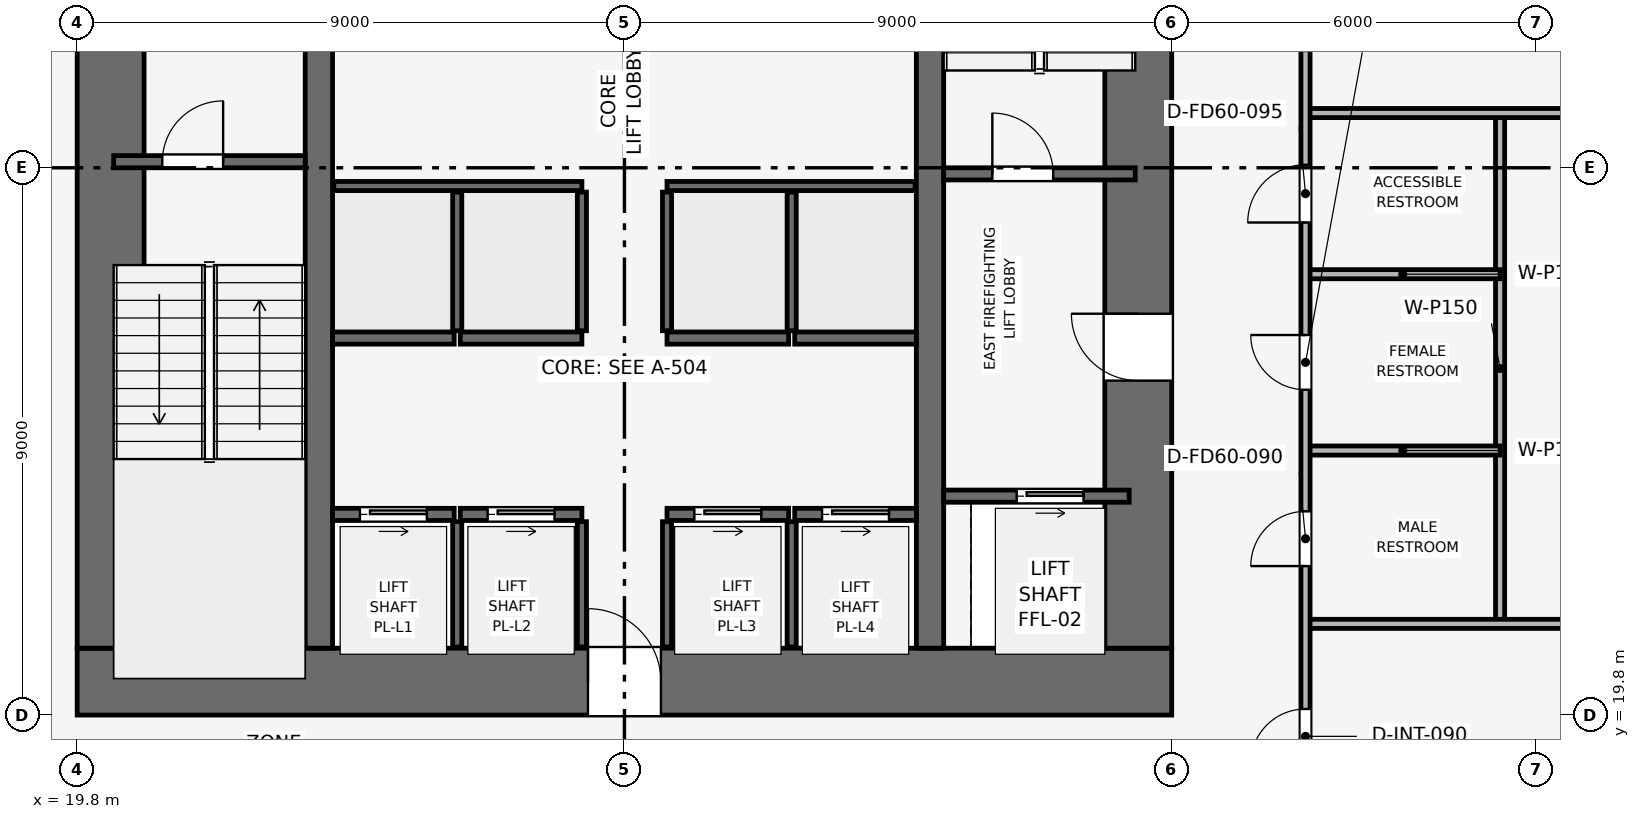
"""IFC4 building model, lengths in metres.
Left out: names, types, materials, properties, quantities, classifications, styles, units other than length and angle.
Written with IfcOpenShell. Run it as: python <this file> out.ifc"""

import sys

from ifc_helpers import new_model, si_unit, direction, frame, frame_2d, origin, place, context, subcontext, project, spatial, rectangle, extrude, element, fill, save


model = new_model("IFC4")
c1 = context("Model", 3, precision=1e-05, world=origin(), true_north=direction((0.0, 1.0)))
c2 = subcontext(c1, "Body", "Model", "MODEL_VIEW")
j1 = project(units=[si_unit("LENGTHUNIT", "METRE"), si_unit("PLANEANGLEUNIT", "RADIAN")], contexts=[c1])
p1 = place(None, origin())
s1 = spatial("IfcSite", under=j1, at=p1, CompositionType="ELEMENT")
p2 = place(p1, origin())
s2 = spatial("IfcBuilding", under=s1, at=p2, CompositionType="ELEMENT")
p3 = place(p2, frame((0.0, 0.0, 45.6)))
s3 = spatial("IfcBuildingStorey", under=s2, at=p3, CompositionType="ELEMENT", Elevation=45.6)
p4 = place(p3, frame((19.8, 20.35, 0.0), z_axis=(0.0, 0.0, 1.0), x_axis=(1.0, 0.0, 0.0)))
e1 = element("IfcWall", 1, at=p4, inside=s3, PredefinedType="SHEAR", context=c2, shape_type="SweptSolid", body=[
    extrude(rectangle(XDim=18.0, YDim=1.1, at=frame_2d((9.0, 0.0))), origin(), (0.0, 0.0, 1.0), 3.9),
])
p5 = place(p4, frame((8.4, 0.0, 0.0)))
e2 = element("IfcOpeningElement", 2, at=p5, cuts=e1, PredefinedType="OPENING", context=c2, shape_type="SweptSolid", body=[
    extrude(rectangle(XDim=1.2, YDim=2.2, at=frame_2d((0.6, 1.1))), frame((0.0, 0.56, 0.0), z_axis=(0.0, -1.0, 0.0), x_axis=(1.0, 0.0, 0.0)), (0.0, 0.0, 1.0), 1.12),
])
p6 = place(p3, frame((20.35, 20.9, 0.0), z_axis=(0.0, 0.0, 1.0), x_axis=(0.0, 1.0, 0.0)))
e3 = element("IfcWall", 3, at=p6, inside=s3, PredefinedType="SHEAR", context=c2, shape_type="SweptSolid", body=[
    extrude(rectangle(XDim=15.8, YDim=1.1, at=frame_2d((7.9, 0.0))), origin(), (0.0, 0.0, 1.0), 3.9),
])
p7 = place(p6, frame((9.9, 0.0, 0.0)))
e4 = element("IfcOpeningElement", 4, at=p7, cuts=e3, PredefinedType="OPENING", context=c2, shape_type="SweptSolid", body=[
    extrude(rectangle(XDim=1.1, YDim=2.15, at=frame_2d((0.55, 1.075))), frame((0.0, 0.56, 0.0), z_axis=(0.0, -1.0, 0.0), x_axis=(1.0, 0.0, 0.0)), (0.0, 0.0, 1.0), 1.12),
])
p8 = place(p3, frame((37.25, 20.9, 0.0), z_axis=(0.0, 0.0, 1.0), x_axis=(0.0, 1.0, 0.0)))
e5 = element("IfcWall", 5, at=p8, inside=s3, PredefinedType="SHEAR", context=c2, shape_type="SweptSolid", body=[
    extrude(rectangle(XDim=15.8, YDim=1.1, at=frame_2d((7.9, 0.0))), origin(), (0.0, 0.0, 1.0), 3.9),
])
p9 = place(p8, frame((4.4, 0.0, 0.0)))
e6 = element("IfcOpeningElement", 6, at=p9, cuts=e5, PredefinedType="OPENING", context=c2, shape_type="SweptSolid", body=[
    extrude(rectangle(XDim=1.1, YDim=2.15, at=frame_2d((0.55, 1.075))), frame((0.0, 0.56, 0.0), z_axis=(0.0, -1.0, 0.0), x_axis=(1.0, 0.0, 0.0)), (0.0, 0.0, 1.0), 1.12),
])
for number, where, z_axis, x_axis in (
    (7, (23.775, 20.9, 0.0), (0.0, 0.0, 1.0), (0.0, 1.0, 0.0)),
    (8, (33.825, 20.9, 0.0), (0.0, 0.0, 1.0), (0.0, 1.0, 0.0)),
):
    element("IfcWall", number, at=place(p3, frame(where, z_axis=z_axis, x_axis=x_axis)), inside=s3, PredefinedType="SHEAR", context=c2, shape_type="SweptSolid", body=[
        extrude(rectangle(XDim=15.8, YDim=0.45, at=frame_2d((7.9, 0.0))), origin(), (0.0, 0.0, 1.0), 3.9),
    ])
p10 = place(p3, frame((20.4, 28.9, 0.0), z_axis=(0.0, 0.0, 1.0), x_axis=(1.0, 0.0, 0.0)))
e9 = element("IfcWall", 9, at=p10, inside=s3, PredefinedType="SHEAR", context=c2, shape_type="SweptSolid", body=[
    extrude(rectangle(XDim=3.15, YDim=0.2, at=frame_2d((1.575, 0.0))), origin(), (0.0, 0.0, 1.0), 3.65),
])
p11 = place(p10, frame((0.8, 0.0, 0.0)))
e10 = element("IfcOpeningElement", 10, at=p11, cuts=e9, PredefinedType="OPENING", context=c2, shape_type="SweptSolid", body=[
    extrude(rectangle(XDim=1.0, YDim=2.1, at=frame_2d((0.5, 1.05))), frame((0.0, 0.11, 0.0), z_axis=(0.0, -1.0, 0.0), x_axis=(1.0, 0.0, 0.0)), (0.0, 0.0, 1.0), 0.22),
])
p12 = place(p3, frame((34.05, 28.7, 0.0), z_axis=(0.0, 0.0, 1.0), x_axis=(1.0, 0.0, 0.0)))
e11 = element("IfcWall", 11, at=p12, inside=s3, PredefinedType="SHEAR", context=c2, shape_type="SweptSolid", body=[
    extrude(rectangle(XDim=3.15, YDim=0.2, at=frame_2d((1.575, 0.0))), origin(), (0.0, 0.0, 1.0), 3.65),
])
p13 = place(p12, frame((0.8, 0.0, 0.0)))
e12 = element("IfcOpeningElement", 12, at=p13, cuts=e11, PredefinedType="OPENING", context=c2, shape_type="SweptSolid", body=[
    extrude(rectangle(XDim=1.0, YDim=2.1, at=frame_2d((0.5, 1.05))), frame((0.0, 0.11, 0.0), z_axis=(0.0, -1.0, 0.0), x_axis=(1.0, 0.0, 0.0)), (0.0, 0.0, 1.0), 0.22),
])
p14 = place(p3, frame((34.05, 23.4, 0.0), z_axis=(0.0, 0.0, 1.0), x_axis=(1.0, 0.0, 0.0)))
e13 = element("IfcWall", 13, at=p14, inside=s3, PredefinedType="SHEAR", context=c2, shape_type="SweptSolid", body=[
    extrude(rectangle(XDim=3.05, YDim=0.2, at=frame_2d((1.525, 0.0))), origin(), (0.0, 0.0, 1.0), 3.65),
])
p15 = place(p14, frame((1.2, 0.0, 0.0)))
e14 = element("IfcOpeningElement", 14, at=p15, cuts=e13, PredefinedType="OPENING", context=c2, shape_type="SweptSolid", body=[
    extrude(rectangle(XDim=1.1, YDim=2.15, at=frame_2d((0.55, 1.075))), frame((0.0, 0.11, 0.0), z_axis=(0.0, -1.0, 0.0), x_axis=(1.0, 0.0, 0.0)), (0.0, 0.0, 1.0), 0.22),
])
p16 = place(p3, frame((24.0, 23.1, 0.0), z_axis=(0.0, 0.0, 1.0), x_axis=(1.0, 0.0, 0.0)))
e15 = element("IfcWall", 15, at=p16, inside=s3, PredefinedType="SHEAR", context=c2, shape_type="SweptSolid", body=[
    extrude(rectangle(XDim=2.0, YDim=0.2, at=frame_2d((1.0, 0.0))), origin(), (0.0, 0.0, 1.0), 3.65),
])
p17 = place(p16, frame((0.45, 0.0, 0.0)))
e16 = element("IfcOpeningElement", 16, at=p17, cuts=e15, PredefinedType="OPENING", context=c2, shape_type="SweptSolid", body=[
    extrude(rectangle(XDim=1.1, YDim=2.15, at=frame_2d((0.55, 1.075))), frame((0.0, 0.11, 0.0), z_axis=(0.0, -1.0, 0.0), x_axis=(1.0, 0.0, 0.0)), (0.0, 0.0, 1.0), 0.22),
])
p18 = place(p3, frame((26.1, 23.1, 0.0), z_axis=(0.0, 0.0, 1.0), x_axis=(1.0, 0.0, 0.0)))
e17 = element("IfcWall", 17, at=p18, inside=s3, PredefinedType="SHEAR", context=c2, shape_type="SweptSolid", body=[
    extrude(rectangle(XDim=2.0, YDim=0.2, at=frame_2d((1.0, 0.0))), origin(), (0.0, 0.0, 1.0), 3.65),
])
p19 = place(p18, frame((0.45, 0.0, 0.0)))
e18 = element("IfcOpeningElement", 18, at=p19, cuts=e17, PredefinedType="OPENING", context=c2, shape_type="SweptSolid", body=[
    extrude(rectangle(XDim=1.1, YDim=2.15, at=frame_2d((0.55, 1.075))), frame((0.0, 0.11, 0.0), z_axis=(0.0, -1.0, 0.0), x_axis=(1.0, 0.0, 0.0)), (0.0, 0.0, 1.0), 0.22),
])
p20 = place(p3, frame((29.5, 23.1, 0.0), z_axis=(0.0, 0.0, 1.0), x_axis=(1.0, 0.0, 0.0)))
e19 = element("IfcWall", 19, at=p20, inside=s3, PredefinedType="SHEAR", context=c2, shape_type="SweptSolid", body=[
    extrude(rectangle(XDim=2.0, YDim=0.2, at=frame_2d((1.0, 0.0))), origin(), (0.0, 0.0, 1.0), 3.65),
])
p21 = place(p20, frame((0.45, 0.0, 0.0)))
e20 = element("IfcOpeningElement", 20, at=p21, cuts=e19, PredefinedType="OPENING", context=c2, shape_type="SweptSolid", body=[
    extrude(rectangle(XDim=1.1, YDim=2.15, at=frame_2d((0.55, 1.075))), frame((0.0, 0.11, 0.0), z_axis=(0.0, -1.0, 0.0), x_axis=(1.0, 0.0, 0.0)), (0.0, 0.0, 1.0), 0.22),
])
p22 = place(p3, frame((31.6, 23.1, 0.0), z_axis=(0.0, 0.0, 1.0), x_axis=(1.0, 0.0, 0.0)))
e21 = element("IfcWall", 21, at=p22, inside=s3, PredefinedType="SHEAR", context=c2, shape_type="SweptSolid", body=[
    extrude(rectangle(XDim=2.0, YDim=0.2, at=frame_2d((1.0, 0.0))), origin(), (0.0, 0.0, 1.0), 3.65),
])
p23 = place(p22, frame((0.45, 0.0, 0.0)))
e22 = element("IfcOpeningElement", 22, at=p23, cuts=e21, PredefinedType="OPENING", context=c2, shape_type="SweptSolid", body=[
    extrude(rectangle(XDim=1.1, YDim=2.15, at=frame_2d((0.55, 1.075))), frame((0.0, 0.11, 0.0), z_axis=(0.0, -1.0, 0.0), x_axis=(1.0, 0.0, 0.0)), (0.0, 0.0, 1.0), 0.22),
])
for number, where, z_axis, x_axis in (
    (23, (24.0, 26.0, 0.0), (0.0, 0.0, 1.0), (1.0, 0.0, 0.0)),
    (24, (26.1, 26.0, 0.0), (0.0, 0.0, 1.0), (1.0, 0.0, 0.0)),
    (25, (29.5, 26.0, 0.0), (0.0, 0.0, 1.0), (1.0, 0.0, 0.0)),
    (26, (31.6, 26.0, 0.0), (0.0, 0.0, 1.0), (1.0, 0.0, 0.0)),
):
    element("IfcWall", number, at=place(p3, frame(where, z_axis=z_axis, x_axis=x_axis)), inside=s3, PredefinedType="SHEAR", context=c2, shape_type="SweptSolid", body=[
        extrude(rectangle(XDim=2.0, YDim=0.2, at=frame_2d((1.0, 0.0))), origin(), (0.0, 0.0, 1.0), 3.65),
    ])
for number, where, z_axis, x_axis in (
    (27, (26.05, 20.92, 0.0), (0.0, 0.0, 1.0), (0.0, 1.0, 0.0)),
    (28, (28.1, 20.92, 0.0), (0.0, 0.0, 1.0), (0.0, 1.0, 0.0)),
    (29, (29.5, 20.92, 0.0), (0.0, 0.0, 1.0), (0.0, 1.0, 0.0)),
    (30, (31.55, 20.92, 0.0), (0.0, 0.0, 1.0), (0.0, 1.0, 0.0)),
):
    element("IfcWall", number, at=place(p3, frame(where, z_axis=z_axis, x_axis=x_axis)), inside=s3, PredefinedType="SHEAR", context=c2, shape_type="SweptSolid", body=[
        extrude(rectangle(XDim=2.06, YDim=0.15, at=frame_2d((1.03, 0.0))), origin(), (0.0, 0.0, 1.0), 3.65),
    ])
for number, where, z_axis, x_axis in (
    (31, (24.02, 28.5, 0.0), (0.0, 0.0, 1.0), (1.0, 0.0, 0.0)),
    (32, (29.5, 28.5, 0.0), (0.0, 0.0, 1.0), (1.0, 0.0, 0.0)),
):
    element("IfcWall", number, at=place(p3, frame(where, z_axis=z_axis, x_axis=x_axis)), inside=s3, PredefinedType="SHEAR", context=c2, shape_type="SweptSolid", body=[
        extrude(rectangle(XDim=4.08, YDim=0.15, at=frame_2d((2.04, 0.0))), origin(), (0.0, 0.0, 1.0), 3.65),
    ])
for number, where, z_axis, x_axis in (
    (33, (26.05, 26.12, 0.0), (0.0, 0.0, 1.0), (0.0, 1.0, 0.0)),
    (34, (28.1, 26.12, 0.0), (0.0, 0.0, 1.0), (0.0, 1.0, 0.0)),
    (35, (29.5, 26.12, 0.0), (0.0, 0.0, 1.0), (0.0, 1.0, 0.0)),
    (36, (31.55, 26.12, 0.0), (0.0, 0.0, 1.0), (0.0, 1.0, 0.0)),
):
    element("IfcWall", number, at=place(p3, frame(where, z_axis=z_axis, x_axis=x_axis)), inside=s3, PredefinedType="SHEAR", context=c2, shape_type="SweptSolid", body=[
        extrude(rectangle(XDim=2.28, YDim=0.15, at=frame_2d((1.14, 0.0))), origin(), (0.0, 0.0, 1.0), 3.65),
    ])
p24 = place(p3, frame((43.2, 21.3, 0.0), z_axis=(0.0, 0.0, 1.0), x_axis=(0.0, 1.0, 0.0)))
e37 = element("IfcWall", 37, at=p24, inside=s3, PredefinedType="PARTITIONING", context=c2, shape_type="SweptSolid", body=[
    extrude(rectangle(XDim=8.4, YDim=0.15, at=frame_2d((4.2, 0.0))), origin(), (0.0, 0.0, 1.0), 3.085),
])
p25 = place(p3, frame((40.0, 21.3, 0.0), z_axis=(0.0, 0.0, 1.0), x_axis=(1.0, 0.0, 0.0)))
e38 = element("IfcWall", 38, at=p25, inside=s3, PredefinedType="PARTITIONING", context=c2, shape_type="SweptSolid", body=[
    extrude(rectangle(XDim=16.57, YDim=0.15, at=frame_2d((8.285, 0.0))), origin(), (0.0, 0.0, 1.0), 2.935),
])
p26 = place(p25, frame((9.435, 0.0, 0.0)))
e39 = element("IfcOpeningElement", 39, at=p26, cuts=e38, PredefinedType="OPENING", context=c2, shape_type="SweptSolid", body=[
    extrude(rectangle(XDim=0.9, YDim=2.1, at=frame_2d((0.45, 1.05))), frame((0.0, 0.085, 0.0), z_axis=(0.0, -1.0, 0.0), x_axis=(1.0, 0.0, 0.0)), (0.0, 0.0, 1.0), 0.17),
])
p27 = place(p3, frame((40.0, 29.7, 0.0), z_axis=(0.0, 0.0, 1.0), x_axis=(1.0, 0.0, 0.0)))
e40 = element("IfcWall", 40, at=p27, inside=s3, PredefinedType="PARTITIONING", context=c2, shape_type="SweptSolid", body=[
    extrude(rectangle(XDim=16.57, YDim=0.15, at=frame_2d((8.285, 0.0))), origin(), (0.0, 0.0, 1.0), 2.935),
])
for number, where, z_axis, x_axis in (
    (41, (40.0, 24.15, 0.0), (0.0, 0.0, 1.0), (1.0, 0.0, 0.0)),
    (42, (40.0, 27.05, 0.0), (0.0, 0.0, 1.0), (1.0, 0.0, 0.0)),
):
    element("IfcWall", number, at=place(p3, frame(where, z_axis=z_axis, x_axis=x_axis)), inside=s3, PredefinedType="PARTITIONING", context=c2, shape_type="SweptSolid", body=[
        extrude(rectangle(XDim=3.2, YDim=0.15, at=frame_2d((1.6, 0.0))), origin(), (0.0, 0.0, 1.0), 3.65),
    ])
p28 = place(p3, frame((40.0, 17.6, 0.0), z_axis=(0.0, 0.0, 1.0), x_axis=(0.0, 1.0, 0.0)))
e43 = element("IfcWall", 43, at=p28, inside=s3, PredefinedType="PARTITIONING", context=c2, shape_type="SweptSolid", body=[
    extrude(rectangle(XDim=22.4, YDim=0.15, at=frame_2d((11.2, 0.0))), origin(), (0.0, 0.0, 1.0), 3.085),
])
p29 = place(p28, frame((1.4, 0.0, 0.0)))
e44 = element("IfcOpeningElement", 44, at=p29, cuts=e43, PredefinedType="OPENING", context=c2, shape_type="SweptSolid", body=[
    extrude(rectangle(XDim=0.9, YDim=2.1, at=frame_2d((0.45, 1.05))), frame((0.0, 0.085, 0.0), z_axis=(0.0, -1.0, 0.0), x_axis=(1.0, 0.0, 0.0)), (0.0, 0.0, 1.0), 0.17),
])
p30 = place(p28, frame((4.65, 0.0, 0.0)))
e45 = element("IfcOpeningElement", 45, at=p30, cuts=e43, PredefinedType="OPENING", context=c2, shape_type="SweptSolid", body=[
    extrude(rectangle(XDim=0.9, YDim=2.1, at=frame_2d((0.45, 1.05))), frame((0.0, 0.085, 0.0), z_axis=(0.0, -1.0, 0.0), x_axis=(1.0, 0.0, 0.0)), (0.0, 0.0, 1.0), 0.17),
])
p31 = place(p28, frame((7.55, 0.0, 0.0)))
e46 = element("IfcOpeningElement", 46, at=p31, cuts=e43, PredefinedType="OPENING", context=c2, shape_type="SweptSolid", body=[
    extrude(rectangle(XDim=0.9, YDim=2.1, at=frame_2d((0.45, 1.05))), frame((0.0, 0.085, 0.0), z_axis=(0.0, -1.0, 0.0), x_axis=(1.0, 0.0, 0.0)), (0.0, 0.0, 1.0), 0.17),
])
p32 = place(p28, frame((10.3, 0.0, 0.0)))
e47 = element("IfcOpeningElement", 47, at=p32, cuts=e43, PredefinedType="OPENING", context=c2, shape_type="SweptSolid", body=[
    extrude(rectangle(XDim=0.95, YDim=2.1, at=frame_2d((0.475, 1.05))), frame((0.0, 0.085, 0.0), z_axis=(0.0, -1.0, 0.0), x_axis=(1.0, 0.0, 0.0)), (0.0, 0.0, 1.0), 0.17),
])
p33 = place(p28, frame((16.8, 0.0, 0.0)))
e48 = element("IfcOpeningElement", 48, at=p33, cuts=e43, PredefinedType="OPENING", context=c2, shape_type="SweptSolid", body=[
    extrude(rectangle(XDim=0.9, YDim=2.1, at=frame_2d((0.45, 1.05))), frame((0.0, 0.085, 0.0), z_axis=(0.0, -1.0, 0.0), x_axis=(1.0, 0.0, 0.0)), (0.0, 0.0, 1.0), 0.17),
])
p34 = place(p11, origin())
e49 = element("IfcDoor", 49, at=p34, inside=s3, OperationType="SINGLE_SWING_RIGHT", PredefinedType="DOOR", context=c2, shape_type="SweptSolid", body=[
    extrude(rectangle(XDim=1.0, YDim=2.1, at=frame_2d((0.5, 1.05))), frame((0.0, 0.025, 0.0), z_axis=(0.0, -1.0, 0.0), x_axis=(1.0, 0.0, 0.0)), (0.0, 0.0, 1.0), 0.05),
])
fill(e10, e49)
p35 = place(p13, origin())
e50 = element("IfcDoor", 50, at=p35, inside=s3, OperationType="SINGLE_SWING_LEFT", PredefinedType="DOOR", context=c2, shape_type="SweptSolid", body=[
    extrude(rectangle(XDim=1.0, YDim=2.1, at=frame_2d((0.5, 1.05))), frame((0.0, 0.025, 0.0), z_axis=(0.0, -1.0, 0.0), x_axis=(1.0, 0.0, 0.0)), (0.0, 0.0, 1.0), 0.05),
])
fill(e12, e50)
p36 = place(p15, origin())
e51 = element("IfcDoor", 51, at=p36, inside=s3, OperationType="SLIDING_TO_RIGHT", PredefinedType="DOOR", context=c2, shape_type="SweptSolid", body=[
    extrude(rectangle(XDim=1.1, YDim=2.15, at=frame_2d((0.55, 1.075))), frame((0.0, 0.025, 0.0), z_axis=(0.0, -1.0, 0.0), x_axis=(1.0, 0.0, 0.0)), (0.0, 0.0, 1.0), 0.05),
])
fill(e14, e51)
p37 = place(p17, origin())
e52 = element("IfcDoor", 52, at=p37, inside=s3, OperationType="SLIDING_TO_RIGHT", PredefinedType="DOOR", context=c2, shape_type="SweptSolid", body=[
    extrude(rectangle(XDim=1.1, YDim=2.15, at=frame_2d((0.55, 1.075))), frame((0.0, 0.025, 0.0), z_axis=(0.0, -1.0, 0.0), x_axis=(1.0, 0.0, 0.0)), (0.0, 0.0, 1.0), 0.05),
])
fill(e16, e52)
p38 = place(p19, origin())
e53 = element("IfcDoor", 53, at=p38, inside=s3, OperationType="SLIDING_TO_RIGHT", PredefinedType="DOOR", context=c2, shape_type="SweptSolid", body=[
    extrude(rectangle(XDim=1.1, YDim=2.15, at=frame_2d((0.55, 1.075))), frame((0.0, 0.025, 0.0), z_axis=(0.0, -1.0, 0.0), x_axis=(1.0, 0.0, 0.0)), (0.0, 0.0, 1.0), 0.05),
])
fill(e18, e53)
p39 = place(p21, origin())
e54 = element("IfcDoor", 54, at=p39, inside=s3, OperationType="SLIDING_TO_RIGHT", PredefinedType="DOOR", context=c2, shape_type="SweptSolid", body=[
    extrude(rectangle(XDim=1.1, YDim=2.15, at=frame_2d((0.55, 1.075))), frame((0.0, 0.025, 0.0), z_axis=(0.0, -1.0, 0.0), x_axis=(1.0, 0.0, 0.0)), (0.0, 0.0, 1.0), 0.05),
])
fill(e20, e54)
p40 = place(p23, origin())
e55 = element("IfcDoor", 55, at=p40, inside=s3, OperationType="SLIDING_TO_RIGHT", PredefinedType="DOOR", context=c2, shape_type="SweptSolid", body=[
    extrude(rectangle(XDim=1.1, YDim=2.15, at=frame_2d((0.55, 1.075))), frame((0.0, 0.025, 0.0), z_axis=(0.0, -1.0, 0.0), x_axis=(1.0, 0.0, 0.0)), (0.0, 0.0, 1.0), 0.05),
])
fill(e22, e55)
p41 = place(p29, origin())
e56 = element("IfcDoor", 56, at=p41, inside=s3, OperationType="SINGLE_SWING_LEFT", PredefinedType="DOOR", context=c2, shape_type="SweptSolid", body=[
    extrude(rectangle(XDim=0.9, YDim=2.1, at=frame_2d((0.45, 1.05))), frame((0.0, 0.025, 0.0), z_axis=(0.0, -1.0, 0.0), x_axis=(1.0, 0.0, 0.0)), (0.0, 0.0, 1.0), 0.05),
])
fill(e44, e56)
p42 = place(p30, origin())
e57 = element("IfcDoor", 57, at=p42, inside=s3, OperationType="SINGLE_SWING_LEFT", PredefinedType="DOOR", context=c2, shape_type="SweptSolid", body=[
    extrude(rectangle(XDim=0.9, YDim=2.1, at=frame_2d((0.45, 1.05))), frame((0.0, 0.025, 0.0), z_axis=(0.0, -1.0, 0.0), x_axis=(1.0, 0.0, 0.0)), (0.0, 0.0, 1.0), 0.05),
])
fill(e45, e57)
p43 = place(p31, origin())
e58 = element("IfcDoor", 58, at=p43, inside=s3, OperationType="SINGLE_SWING_RIGHT", PredefinedType="DOOR", context=c2, shape_type="SweptSolid", body=[
    extrude(rectangle(XDim=0.9, YDim=2.1, at=frame_2d((0.45, 1.05))), frame((0.0, 0.025, 0.0), z_axis=(0.0, -1.0, 0.0), x_axis=(1.0, 0.0, 0.0)), (0.0, 0.0, 1.0), 0.05),
])
fill(e46, e58)
p44 = place(p32, origin())
e59 = element("IfcDoor", 59, at=p44, inside=s3, OperationType="SINGLE_SWING_LEFT", PredefinedType="DOOR", context=c2, shape_type="SweptSolid", body=[
    extrude(rectangle(XDim=0.95, YDim=2.1, at=frame_2d((0.475, 1.05))), frame((0.0, 0.025, 0.0), z_axis=(0.0, -1.0, 0.0), x_axis=(1.0, 0.0, 0.0)), (0.0, 0.0, 1.0), 0.05),
])
fill(e47, e59)
p45 = place(p9, origin())
e60 = element("IfcDoor", 60, at=p45, inside=s3, OperationType="SINGLE_SWING_RIGHT", PredefinedType="DOOR", context=c2, shape_type="SweptSolid", body=[
    extrude(rectangle(XDim=1.1, YDim=2.15, at=frame_2d((0.55, 1.075))), frame((0.0, 0.025, 0.0), z_axis=(0.0, -1.0, 0.0), x_axis=(1.0, 0.0, 0.0)), (0.0, 0.0, 1.0), 0.05),
])
fill(e6, e60)
p46 = place(p5, origin())
e61 = element("IfcDoor", 61, at=p46, inside=s3, OperationType="SINGLE_SWING_LEFT", PredefinedType="DOOR", context=c2, shape_type="SweptSolid", body=[
    extrude(rectangle(XDim=1.2, YDim=2.2, at=frame_2d((0.6, 1.1))), frame((0.0, 0.025, 0.0), z_axis=(0.0, -1.0, 0.0), x_axis=(1.0, 0.0, 0.0)), (0.0, 0.0, 1.0), 0.05),
])
fill(e2, e61)
save(model, sys.argv[1])
